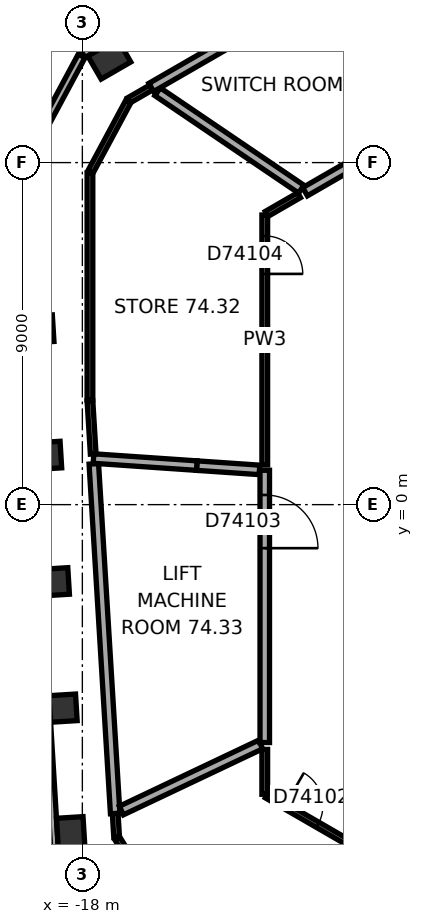
"""IFC4 building model, lengths in metres.
Left out: names, types, materials, properties, quantities, classifications, styles, units other than length and angle.
Written with IfcOpenShell. Run it as: python <this file> out.ifc"""

import sys

from ifc_helpers import new_model, si_unit, direction, frame, frame_2d, origin, origin_2d, place, context, subcontext, project, spatial, rectangle, extrude, element, fill, save


model = new_model("IFC4")
c1 = context("Model", 3, precision=1e-05, world=origin(), true_north=direction((0.0, 1.0)))
c2 = subcontext(c1, "Body", "Model", "MODEL_VIEW")
j1 = project(units=[si_unit("LENGTHUNIT", "METRE"), si_unit("PLANEANGLEUNIT", "RADIAN")], contexts=[c1])
p1 = place(None, origin())
s1 = spatial("IfcSite", under=j1, at=p1, CompositionType="ELEMENT")
p2 = place(p1, origin())
s2 = spatial("IfcBuilding", under=s1, at=p2, CompositionType="ELEMENT")
p3 = place(p2, frame((0.0, 0.0, 300.5)))
s3 = spatial("IfcBuildingStorey", under=s2, at=p3, CompositionType="ELEMENT", Elevation=300.5)
p4 = place(p3, frame((-17.291, 11.726, 0.0), z_axis=(0.0, 0.0, 1.0), x_axis=(-0.866025403784, -0.5, 0.0)))
e1 = element("IfcColumn", 1, at=p4, inside=s3, PredefinedType="COLUMN", context=c2, shape_type="SweptSolid", body=[
    extrude(rectangle(XDim=0.9, YDim=0.7, at=origin_2d()), origin(), (0.0, 0.0, 1.0), 4.5),
])
for number, where, z_axis, x_axis in (
    (2, (-19.118, 4.621, 0.0), (0.0, 0.0, 1.0), (0.061, -0.998, 0.0)),
    (3, (-18.914, 1.296, 0.0), (0.0, 0.0, 1.0), (0.061, -0.998, 0.0)),
    (4, (-18.711, -2.03, 0.0), (0.0, 0.0, 1.0), (0.061, -0.998, 0.0)),
    (5, (-18.508, -5.355, 0.0), (0.0, 0.0, 1.0), (0.061, -0.998, 0.0)),
):
    element("IfcColumn", number, at=place(p3, frame(where, z_axis=z_axis, x_axis=x_axis)), inside=s3, PredefinedType="COLUMN", context=c2, shape_type="SweptSolid", body=[
        extrude(rectangle(XDim=0.7, YDim=0.7, at=origin_2d()), origin(), (0.0, 0.0, 1.0), 4.5),
    ])
p5 = place(p3, frame((-18.304, -8.68, 0.0), z_axis=(0.0, 0.0, 1.0), x_axis=(0.061048539535, -0.998134798422, 0.0)))
e6 = element("IfcColumn", 6, at=p5, inside=s3, PredefinedType="COLUMN", context=c2, shape_type="SweptSolid", body=[
    extrude(rectangle(XDim=0.9, YDim=0.7, at=origin_2d()), origin(), (0.0, 0.0, 1.0), 4.5),
])
p6 = place(p3, frame((-2.624, 20.713, 0.0), z_axis=(0.0, 0.0, 1.0), x_axis=(-0.866026460444, -0.499998169808, 0.0)))
e7 = element("IfcWall", 7, at=p6, inside=s3, PredefinedType="STANDARD", context=c2, shape_type="SweptSolid", body=[
    extrude(rectangle(XDim=17.731, YDim=0.2, at=frame_2d((8.866, 0.0))), origin(), (0.0, 0.0, 1.0), 4.5),
])
p7 = place(p3, frame((-18.018, 11.808, 0.0), z_axis=(0.0, 0.0, 1.0), x_axis=(-0.473318619185, -0.880891301315, 0.0)))
e8 = element("IfcWall", 8, at=p7, inside=s3, PredefinedType="STANDARD", context=c2, shape_type="SweptSolid", body=[
    extrude(rectangle(XDim=3.747, YDim=0.2, at=frame_2d((1.874, 0.0))), origin(), (0.0, 0.0, 1.0), 4.5),
])
p8 = place(p3, frame((-19.803, 8.454, 0.0), z_axis=(0.0, 0.0, 1.0), x_axis=(0.061036717565, -0.998135521414, 0.0)))
e9 = element("IfcWall", 9, at=p8, inside=s3, PredefinedType="STANDARD", context=c2, shape_type="SweptSolid", body=[
    extrude(rectangle(XDim=17.731, YDim=0.2, at=frame_2d((8.866, 0.0))), origin(), (0.0, 0.0, 1.0), 4.5),
])
p9 = place(p3, frame((-15.485, -11.361, 0.0), z_axis=(0.0, 0.0, 1.0), x_axis=(-0.526112913706, 0.850414723551, 0.0)))
e10 = element("IfcWall", 10, at=p9, inside=s3, PredefinedType="PARTITIONING", context=c2, shape_type="SweptSolid", body=[
    extrude(rectangle(XDim=3.026, YDim=0.15, at=frame_2d((1.513, 0.0))), origin(), (0.0, 0.0, 1.0), 4.2),
])
p10 = place(p3, frame((-17.097, -8.754, 0.0), z_axis=(0.0, 0.0, 1.0), x_axis=(-0.061362744718, 0.998115531169, 0.0)))
e11 = element("IfcWall", 11, at=p10, inside=s3, PredefinedType="PARTITIONING", context=c2, shape_type="SweptSolid", body=[
    extrude(rectangle(XDim=0.629, YDim=0.15, at=frame_2d((0.314, 0.0))), origin(), (0.0, 0.0, 1.0), 4.2),
])
p11 = place(p3, frame((-17.136, -8.126, 0.0), z_axis=(0.0, 0.0, 1.0), x_axis=(-0.061029278948, 0.998135976263, 0.0)))
e12 = element("IfcWall", 12, at=p11, inside=s3, PredefinedType="SOLIDWALL", context=c2, shape_type="SweptSolid", body=[
    extrude(rectangle(XDim=9.217, YDim=0.25, at=frame_2d((4.608, 0.0))), origin(), (0.0, 0.0, 1.0), 4.2),
])
p12 = place(p3, frame((-13.148, -7.651, 0.0), z_axis=(0.0, 0.0, 1.0), x_axis=(0.866016920268, -0.500014693593, 0.0)))
e13 = element("IfcWall", 13, at=p12, inside=s3, PredefinedType="PARTITIONING", context=c2, shape_type="SweptSolid", body=[
    extrude(rectangle(XDim=9.16, YDim=0.15, at=frame_2d((4.58, 0.0))), origin(), (0.0, 0.0, 1.0), 4.2),
])
p13 = place(p12, frame((0.55, 0.0, 0.0)))
e14 = element("IfcOpeningElement", 14, at=p13, cuts=e13, PredefinedType="OPENING", context=c2, shape_type="SweptSolid", body=[
    extrude(rectangle(XDim=1.0, YDim=2.1, at=frame_2d((0.5, 1.05))), frame((0.0, 0.085, 0.0), z_axis=(0.0, -1.0, 0.0), x_axis=(1.0, 0.0, 0.0)), (0.0, 0.0, 1.0), 0.17),
])
p14 = place(p3, frame((-13.2, -7.621, 0.0), z_axis=(0.0, 0.0, 1.0), x_axis=(0.0, 1.0, 0.0)))
e15 = element("IfcWall", 15, at=p14, inside=s3, PredefinedType="PARTITIONING", context=c2, shape_type="SweptSolid", body=[
    extrude(rectangle(XDim=1.181, YDim=0.15, at=frame_2d((0.591, 0.0))), origin(), (0.0, 0.0, 1.0), 4.2),
])
p15 = place(p3, frame((-13.308, -6.312, 0.0), z_axis=(0.0, 0.0, 1.0), x_axis=(-0.903573543336, -0.428433019016, 0.0)))
e16 = element("IfcWall", 16, at=p15, inside=s3, PredefinedType="SOLIDWALL", context=c2, shape_type="SweptSolid", body=[
    extrude(rectangle(XDim=4.056, YDim=0.25, at=frame_2d((2.028, 0.0))), origin(), (0.0, 0.0, 1.0), 4.2),
])
p16 = place(p3, frame((-13.2, -6.26, 0.0), z_axis=(0.0, 0.0, 1.0), x_axis=(0.0, 1.0, 0.0)))
e17 = element("IfcWall", 17, at=p16, inside=s3, PredefinedType="SOLIDWALL", context=c2, shape_type="SweptSolid", body=[
    extrude(rectangle(XDim=7.165, YDim=0.25, at=frame_2d((3.582, 0.0))), origin(), (0.0, 0.0, 1.0), 4.2),
])
p17 = place(p16, frame((5.115, 0.0, 0.0)))
e18 = element("IfcOpeningElement", 18, at=p17, cuts=e17, PredefinedType="OPENING", context=c2, shape_type="SweptSolid", body=[
    extrude(rectangle(XDim=1.4, YDim=2.1, at=frame_2d((0.7, 1.05))), frame((0.0, 0.135, 0.0), z_axis=(0.0, -1.0, 0.0), x_axis=(1.0, 0.0, 0.0)), (0.0, 0.0, 1.0), 0.27),
])
p18 = place(p3, frame((-14.989, 1.027, 0.0), z_axis=(0.0, 0.0, 1.0), x_axis=(0.997659944218, -0.068371307604, 0.0)))
e19 = element("IfcWall", 19, at=p18, inside=s3, PredefinedType="SOLIDWALL", context=c2, shape_type="SweptSolid", body=[
    extrude(rectangle(XDim=1.653, YDim=0.25, at=frame_2d((0.827, 0.0))), origin(), (0.0, 0.0, 1.0), 3.5),
])
p19 = place(p3, frame((-14.989, 1.027, 0.0), z_axis=(0.0, 0.0, 1.0), x_axis=(-0.99767192893, 0.068196203891, 0.0)))
e20 = element("IfcWall", 20, at=p19, inside=s3, PredefinedType="SOLIDWALL", context=c2, shape_type="SweptSolid", body=[
    extrude(rectangle(XDim=2.724, YDim=0.25, at=frame_2d((1.362, 0.0))), origin(), (0.0, 0.0, 1.0), 3.5),
])
p20 = place(p3, frame((-13.2, 1.044, 0.0), z_axis=(0.0, 0.0, 1.0), x_axis=(0.0, 1.0, 0.0)))
e21 = element("IfcWall", 21, at=p20, inside=s3, PredefinedType="PARTITIONING", context=c2, shape_type="SweptSolid", body=[
    extrude(rectangle(XDim=6.577, YDim=0.15, at=frame_2d((3.288, 0.0))), origin(), (0.0, 0.0, 1.0), 4.2),
])
p21 = place(p20, frame((5.027, 0.0, 0.0)))
e22 = element("IfcOpeningElement", 22, at=p21, cuts=e21, PredefinedType="OPENING", context=c2, shape_type="SweptSolid", body=[
    extrude(rectangle(XDim=1.0, YDim=2.1, at=frame_2d((0.5, 1.05))), frame((0.0, 0.085, 0.0), z_axis=(0.0, -1.0, 0.0), x_axis=(1.0, 0.0, 0.0)), (0.0, 0.0, 1.0), 0.17),
])
p22 = place(p3, frame((-17.714, 1.333, 0.0), z_axis=(0.0, 0.0, 1.0), x_axis=(-0.06113130974, 0.998129732535, 0.0)))
e23 = element("IfcWall", 23, at=p22, inside=s3, PredefinedType="PARTITIONING", context=c2, shape_type="SweptSolid", body=[
    extrude(rectangle(XDim=1.402, YDim=0.15, at=frame_2d((0.701, 0.0))), origin(), (0.0, 0.0, 1.0), 4.2),
])
p23 = place(p3, frame((-17.8, 2.752, 0.0), z_axis=(0.0, 0.0, 1.0), x_axis=(0.0, 1.0, 0.0)))
e24 = element("IfcWall", 24, at=p23, inside=s3, PredefinedType="PARTITIONING", context=c2, shape_type="SweptSolid", body=[
    extrude(rectangle(XDim=5.976, YDim=0.15, at=frame_2d((2.988, 0.0))), origin(), (0.0, 0.0, 1.0), 4.2),
])
p24 = place(p3, frame((-13.148, 7.651, 0.0), z_axis=(0.0, 0.0, 1.0), x_axis=(0.865896137296, 0.500223829315, 0.0)))
e25 = element("IfcWall", 25, at=p24, inside=s3, PredefinedType="PARTITIONING", context=c2, shape_type="SweptSolid", body=[
    extrude(rectangle(XDim=0.983, YDim=0.15, at=frame_2d((0.492, 0.0))), origin(), (0.0, 0.0, 1.0), 4.2),
])
p25 = place(p3, frame((-12.14, 8.233, 0.0), z_axis=(0.0, 0.0, 1.0), x_axis=(0.866012216201, 0.500022840869, 0.0)))
e26 = element("IfcWall", 26, at=p25, inside=s3, PredefinedType="SOLIDWALL", context=c2, shape_type="SweptSolid", body=[
    extrude(rectangle(XDim=9.357, YDim=0.25, at=frame_2d((4.678, 0.0))), origin(), (0.0, 0.0, 1.0), 4.2),
])
p26 = place(p25, frame((7.407, 0.0, 0.0)))
e27 = element("IfcOpeningElement", 27, at=p26, cuts=e26, PredefinedType="OPENING", context=c2, shape_type="SweptSolid", body=[
    extrude(rectangle(XDim=1.4, YDim=2.1, at=frame_2d((0.7, 1.05))), frame((0.0, 0.135, 0.0), z_axis=(0.0, -1.0, 0.0), x_axis=(1.0, 0.0, 0.0)), (0.0, 0.0, 1.0), 0.27),
])
p27 = place(p3, frame((-12.24, 8.3, 0.0), z_axis=(0.0, 0.0, 1.0), x_axis=(-0.827651287364, 0.561242680598, 0.0)))
e28 = element("IfcWall", 28, at=p27, inside=s3, PredefinedType="SOLIDWALL", context=c2, shape_type="SweptSolid", body=[
    extrude(rectangle(XDim=4.569, YDim=0.25, at=frame_2d((2.285, 0.0))), origin(), (0.0, 0.0, 1.0), 4.2),
])
p28 = place(p3, frame((-17.781, 8.763, 0.0), z_axis=(0.0, 0.0, 1.0), x_axis=(0.473235773647, 0.880935810681, 0.0)))
e29 = element("IfcWall", 29, at=p28, inside=s3, PredefinedType="PARTITIONING", context=c2, shape_type="SweptSolid", body=[
    extrude(rectangle(XDim=2.09, YDim=0.15, at=frame_2d((1.045, 0.0))), origin(), (0.0, 0.0, 1.0), 4.2),
])
p29 = place(p3, frame((-16.773, 10.639, 0.0), z_axis=(0.0, 0.0, 1.0), x_axis=(0.866125498941, 0.499826590014, 0.0)))
e30 = element("IfcWall", 30, at=p29, inside=s3, PredefinedType="PARTITIONING", context=c2, shape_type="SweptSolid", body=[
    extrude(rectangle(XDim=0.677, YDim=0.15, at=frame_2d((0.338, 0.0))), origin(), (0.0, 0.0, 1.0), 4.2),
])
p30 = place(p3, frame((-16.187, 10.977, 0.0), z_axis=(0.0, 0.0, 1.0), x_axis=(0.866022320763, 0.500005339912, 0.0)))
e31 = element("IfcWall", 31, at=p30, inside=s3, PredefinedType="SOLIDWALL", context=c2, shape_type="SweptSolid", body=[
    extrude(rectangle(XDim=12.476, YDim=0.25, at=frame_2d((6.238, 0.0))), origin(), (0.0, 0.0, 1.0), 4.2),
])
p31 = place(p13, origin())
e32 = element("IfcDoor", 32, at=p31, inside=s3, OperationType="SINGLE_SWING_LEFT", PredefinedType="DOOR", context=c2, shape_type="SweptSolid", body=[
    extrude(rectangle(XDim=1.0, YDim=2.1, at=frame_2d((0.5, 1.05))), frame((0.0, 0.025, 0.0), z_axis=(0.0, -1.0, 0.0), x_axis=(1.0, 0.0, 0.0)), (0.0, 0.0, 1.0), 0.05),
])
fill(e14, e32)
p32 = place(p17, origin())
e33 = element("IfcDoor", 33, at=p32, inside=s3, OperationType="SINGLE_SWING_LEFT", PredefinedType="DOOR", context=c2, shape_type="SweptSolid", body=[
    extrude(rectangle(XDim=1.4, YDim=2.1, at=frame_2d((0.7, 1.05))), frame((0.0, 0.025, 0.0), z_axis=(0.0, -1.0, 0.0), x_axis=(1.0, 0.0, 0.0)), (0.0, 0.0, 1.0), 0.05),
])
fill(e18, e33)
p33 = place(p21, origin())
e34 = element("IfcDoor", 34, at=p33, inside=s3, OperationType="SINGLE_SWING_LEFT", PredefinedType="DOOR", context=c2, shape_type="SweptSolid", body=[
    extrude(rectangle(XDim=1.0, YDim=2.1, at=frame_2d((0.5, 1.05))), frame((0.0, 0.025, 0.0), z_axis=(0.0, -1.0, 0.0), x_axis=(1.0, 0.0, 0.0)), (0.0, 0.0, 1.0), 0.05),
])
fill(e22, e34)
save(model, sys.argv[1])
